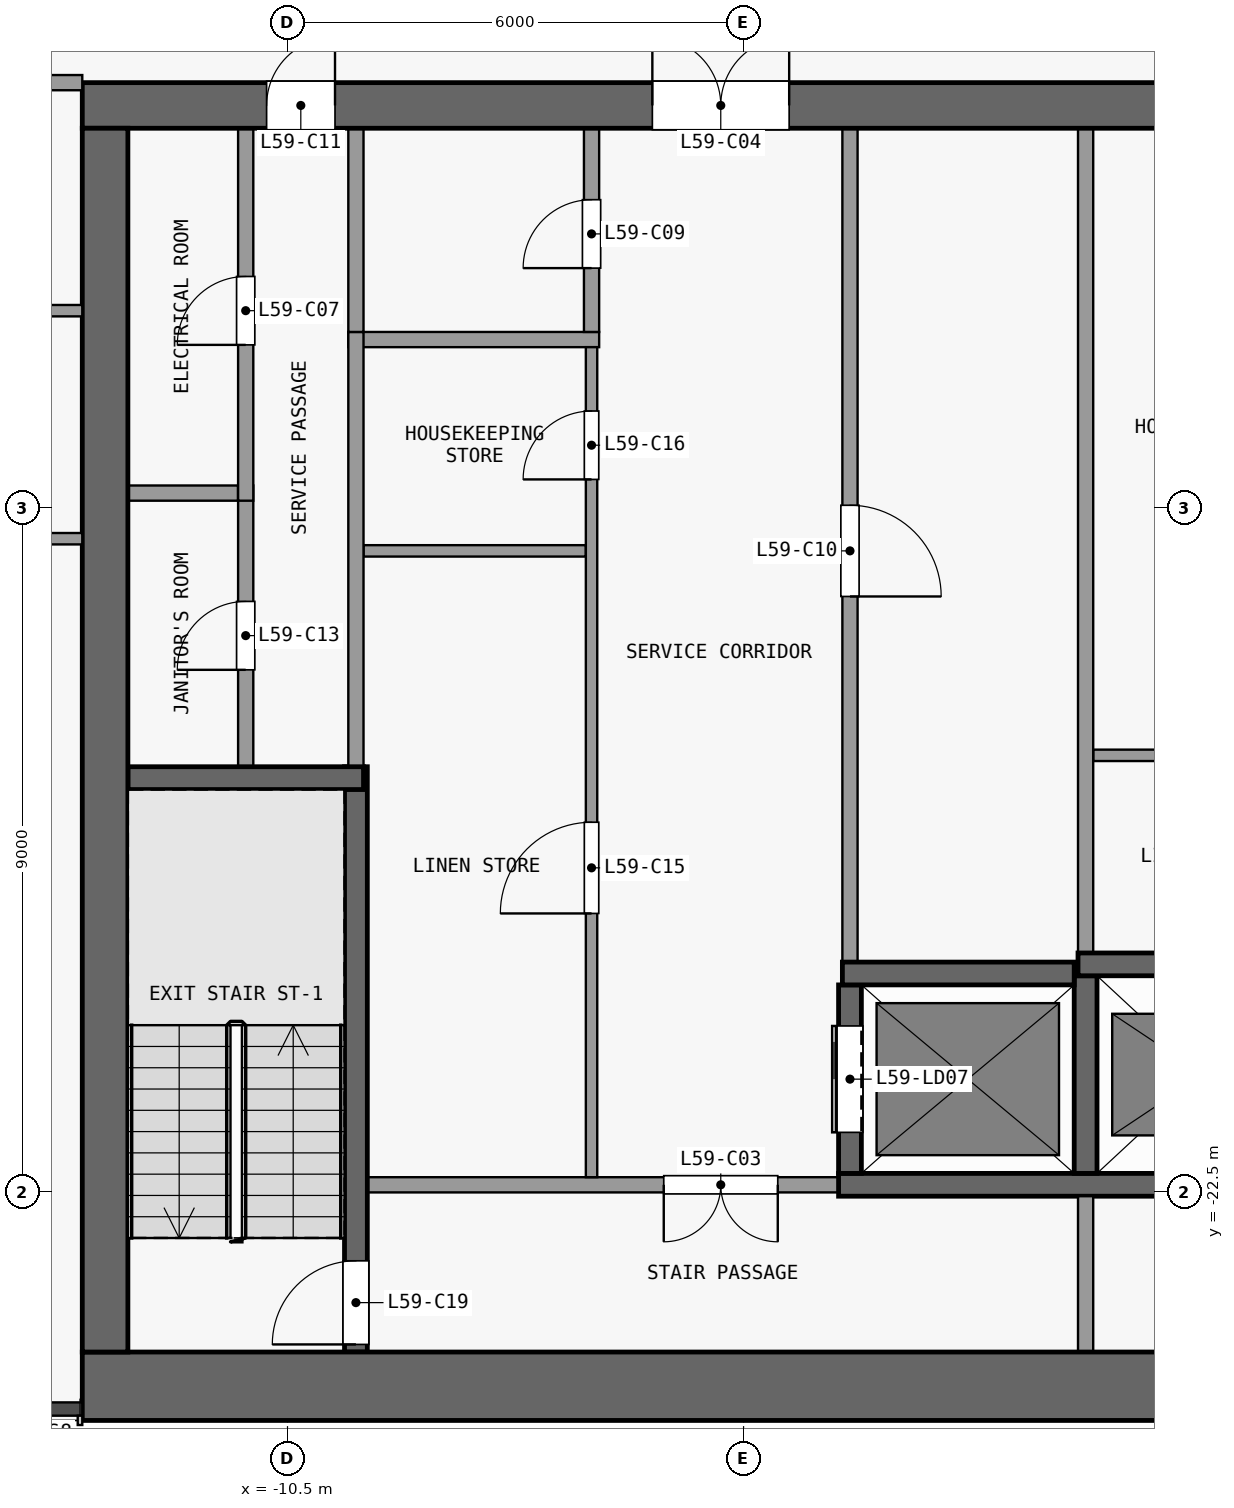
"""IFC4 building model, lengths in metres.
Left out: names, types, materials, properties, quantities, classifications, styles, units other than length and angle.
Written with IfcOpenShell. Run it as: python <this file> out.ifc"""

import sys

from ifc_helpers import new_model, si_unit, direction, frame, frame_2d, origin, place, context, subcontext, project, spatial, rectangle, extrude, element, fill, save


model = new_model("IFC4")
c1 = context("Model", 3, precision=1e-05, world=origin(), true_north=direction((0.0, 1.0)))
c2 = subcontext(c1, "Body", "Model", "MODEL_VIEW")
j1 = project(units=[si_unit("LENGTHUNIT", "METRE"), si_unit("PLANEANGLEUNIT", "RADIAN")], contexts=[c1])
p1 = place(None, origin())
s1 = spatial("IfcSite", under=j1, at=p1, CompositionType="ELEMENT")
p2 = place(p1, origin())
s2 = spatial("IfcBuilding", under=s1, at=p2, CompositionType="ELEMENT")
p3 = place(p2, frame((0.0, 0.0, 233.9)))
s3 = spatial("IfcBuildingStorey", under=s2, at=p3, CompositionType="ELEMENT", Elevation=233.9)
p4 = place(p3, frame((-13.2, -25.05, 0.0), z_axis=(0.0, 0.0, 1.0), x_axis=(1.0, 0.0, 0.0)))
e1 = element("IfcWall", 1, at=p4, inside=s3, PredefinedType="SHEAR", context=c2, shape_type="SweptSolid", body=[
    extrude(rectangle(XDim=26.4, YDim=0.9, at=frame_2d((13.2, 0.0))), origin(), (0.0, 0.0, 1.0), 3.3),
])
p5 = place(p3, frame((-13.2, -8.2, 0.0), z_axis=(0.0, 0.0, 1.0), x_axis=(1.0, 0.0, 0.0)))
e2 = element("IfcWall", 2, at=p5, inside=s3, PredefinedType="SHEAR", context=c2, shape_type="SweptSolid", body=[
    extrude(rectangle(XDim=26.4, YDim=0.6, at=frame_2d((13.2, 0.0))), origin(), (0.0, 0.0, 1.0), 3.3),
])
p6 = place(p5, frame((7.5, 0.0, 0.0)))
e3 = element("IfcOpeningElement", 3, at=p6, cuts=e2, PredefinedType="OPENING", context=c2, shape_type="SweptSolid", body=[
    extrude(rectangle(XDim=1.8, YDim=2.1, at=frame_2d((0.9, 1.05))), frame((0.0, 0.31, 0.0), z_axis=(0.0, -1.0, 0.0), x_axis=(1.0, 0.0, 0.0)), (0.0, 0.0, 1.0), 0.62),
])
p7 = place(p5, frame((17.1, 0.0, 0.0)))
e4 = element("IfcOpeningElement", 4, at=p7, cuts=e2, PredefinedType="OPENING", context=c2, shape_type="SweptSolid", body=[
    extrude(rectangle(XDim=1.8, YDim=2.1, at=frame_2d((0.9, 1.05))), frame((0.0, 0.31, 0.0), z_axis=(0.0, -1.0, 0.0), x_axis=(1.0, 0.0, 0.0)), (0.0, 0.0, 1.0), 0.62),
])
p8 = place(p5, frame((2.425, 0.0, 0.0)))
e5 = element("IfcOpeningElement", 5, at=p8, cuts=e2, PredefinedType="OPENING", context=c2, shape_type="SweptSolid", body=[
    extrude(rectangle(XDim=0.9, YDim=2.1, at=frame_2d((0.45, 1.05))), frame((0.0, 0.31, 0.0), z_axis=(0.0, -1.0, 0.0), x_axis=(1.0, 0.0, 0.0)), (0.0, 0.0, 1.0), 0.62),
])
p9 = place(p5, frame((23.075, 0.0, 0.0)))
e6 = element("IfcOpeningElement", 6, at=p9, cuts=e2, PredefinedType="OPENING", context=c2, shape_type="SweptSolid", body=[
    extrude(rectangle(XDim=0.9, YDim=2.1, at=frame_2d((0.45, 1.05))), frame((0.0, 0.31, 0.0), z_axis=(0.0, -1.0, 0.0), x_axis=(1.0, 0.0, 0.0)), (0.0, 0.0, 1.0), 0.62),
])
p10 = place(p3, frame((-12.9, -24.6, 0.0), z_axis=(0.0, 0.0, 1.0), x_axis=(0.0, 1.0, 0.0)))
e7 = element("IfcWall", 7, at=p10, inside=s3, PredefinedType="SHEAR", context=c2, shape_type="SweptSolid", body=[
    extrude(rectangle(XDim=16.1, YDim=0.6, at=frame_2d((8.05, 0.0))), origin(), (0.0, 0.0, 1.0), 3.3),
])
p11 = place(p3, frame((-3.25, -22.4, 0.0), z_axis=(0.0, 0.0, 1.0), x_axis=(-1.0, 0.0, 0.0)))
e8 = element("IfcWall", 8, at=p11, inside=s3, PredefinedType="PARTITIONING", context=c2, shape_type="SweptSolid", body=[
    extrude(rectangle(XDim=6.2, YDim=0.2, at=frame_2d((3.1, 0.0))), origin(), (0.0, 0.0, 1.0), 3.3),
])
p12 = place(p11, frame((0.8, 0.0, 0.0)))
e9 = element("IfcOpeningElement", 9, at=p12, cuts=e8, PredefinedType="OPENING", context=c2, shape_type="SweptSolid", body=[
    extrude(rectangle(XDim=1.5, YDim=2.1, at=frame_2d((0.75, 1.05))), frame((0.0, 0.11, 0.0), z_axis=(0.0, -1.0, 0.0), x_axis=(1.0, 0.0, 0.0)), (0.0, 0.0, 1.0), 0.22),
])
p13 = place(p3, frame((-3.25, -22.4, 0.0), z_axis=(0.0, 0.0, 1.0), x_axis=(1.0, 0.0, 0.0)))
e10 = element("IfcWall", 10, at=p13, inside=s3, PredefinedType="SHEAR", context=c2, shape_type="SweptSolid", body=[
    extrude(rectangle(XDim=6.5, YDim=0.3, at=frame_2d((3.25, 0.0))), origin(), (0.0, 0.0, 1.0), 3.3),
])
p14 = place(p3, frame((-3.2, -19.62, 0.0), z_axis=(0.0, 0.0, 1.0), x_axis=(1.0, 0.0, 0.0)))
e11 = element("IfcWall", 11, at=p14, inside=s3, PredefinedType="SHEAR", context=c2, shape_type="SweptSolid", body=[
    extrude(rectangle(XDim=3.05, YDim=0.3, at=frame_2d((1.525, 0.0))), origin(), (0.0, 0.0, 1.0), 3.3),
])
p15 = place(p3, frame((-0.1, -19.5, 0.0), z_axis=(0.0, 0.0, 1.0), x_axis=(1.0, 0.0, 0.0)))
e12 = element("IfcWall", 12, at=p15, inside=s3, PredefinedType="SHEAR", context=c2, shape_type="SweptSolid", body=[
    extrude(rectangle(XDim=3.275, YDim=0.3, at=frame_2d((1.638, 0.0))), origin(), (0.0, 0.0, 1.0), 3.3),
])
p16 = place(p3, frame((-12.6, -17.05, 0.0), z_axis=(0.0, 0.0, 1.0), x_axis=(1.0, 0.0, 0.0)))
e13 = element("IfcWall", 13, at=p16, inside=s3, PredefinedType="SHEAR", context=c2, shape_type="SweptSolid", body=[
    extrude(rectangle(XDim=3.1, YDim=0.3, at=frame_2d((1.55, 0.0))), origin(), (0.0, 0.0, 1.0), 3.3),
])
p17 = place(p3, frame((0.1, -16.75, 0.0), z_axis=(0.0, 0.0, 1.0), x_axis=(1.0, 0.0, 0.0)))
e14 = element("IfcWall", 14, at=p17, inside=s3, PredefinedType="PARTITIONING", context=c2, shape_type="SweptSolid", body=[
    extrude(rectangle(XDim=2.925, YDim=0.15, at=frame_2d((1.462, 0.0))), origin(), (0.0, 0.0, 1.0), 3.3),
])
p18 = place(p3, frame((-9.5, -14.06, 0.0), z_axis=(0.0, 0.0, 1.0), x_axis=(1.0, 0.0, 0.0)))
e15 = element("IfcWall", 15, at=p18, inside=s3, PredefinedType="PARTITIONING", context=c2, shape_type="SweptSolid", body=[
    extrude(rectangle(XDim=2.925, YDim=0.15, at=frame_2d((1.462, 0.0))), origin(), (0.0, 0.0, 1.0), 3.3),
])
p19 = place(p3, frame((-12.6, -13.3, 0.0), z_axis=(0.0, 0.0, 1.0), x_axis=(1.0, 0.0, 0.0)))
e16 = element("IfcWall", 16, at=p19, inside=s3, PredefinedType="PARTITIONING", context=c2, shape_type="SweptSolid", body=[
    extrude(rectangle(XDim=1.45, YDim=0.2, at=frame_2d((0.725, 0.0))), origin(), (0.0, 0.0, 1.0), 3.3),
])
p20 = place(p3, frame((-9.7, -11.28, 0.0), z_axis=(0.0, 0.0, 1.0), x_axis=(1.0, 0.0, 0.0)))
e17 = element("IfcWall", 17, at=p20, inside=s3, PredefinedType="PARTITIONING", context=c2, shape_type="SweptSolid", body=[
    extrude(rectangle(XDim=3.3, YDim=0.2, at=frame_2d((1.65, 0.0))), origin(), (0.0, 0.0, 1.0), 3.3),
])
p21 = place(p3, frame((-11.05, -16.9, 0.0), z_axis=(0.0, 0.0, 1.0), x_axis=(0.0, 1.0, 0.0)))
e18 = element("IfcWall", 18, at=p21, inside=s3, PredefinedType="PARTITIONING", context=c2, shape_type="SweptSolid", body=[
    extrude(rectangle(XDim=3.7, YDim=0.2, at=frame_2d((1.85, 0.0))), origin(), (0.0, 0.0, 1.0), 3.3),
])
p22 = place(p21, frame((1.275, 0.0, 0.0)))
e19 = element("IfcOpeningElement", 19, at=p22, cuts=e18, PredefinedType="OPENING", context=c2, shape_type="SweptSolid", body=[
    extrude(rectangle(XDim=0.9, YDim=2.1, at=frame_2d((0.45, 1.05))), frame((0.0, 0.11, 0.0), z_axis=(0.0, -1.0, 0.0), x_axis=(1.0, 0.0, 0.0)), (0.0, 0.0, 1.0), 0.22),
])
p23 = place(p3, frame((-11.05, -13.4, 0.0), z_axis=(0.0, 0.0, 1.0), x_axis=(0.0, 1.0, 0.0)))
e20 = element("IfcWall", 20, at=p23, inside=s3, PredefinedType="PARTITIONING", context=c2, shape_type="SweptSolid", body=[
    extrude(rectangle(XDim=4.9, YDim=0.2, at=frame_2d((2.45, 0.0))), origin(), (0.0, 0.0, 1.0), 3.3),
])
p24 = place(p23, frame((2.05, 0.0, 0.0)))
e21 = element("IfcOpeningElement", 21, at=p24, cuts=e20, PredefinedType="OPENING", context=c2, shape_type="SweptSolid", body=[
    extrude(rectangle(XDim=0.9, YDim=2.1, at=frame_2d((0.45, 1.05))), frame((0.0, 0.11, 0.0), z_axis=(0.0, -1.0, 0.0), x_axis=(1.0, 0.0, 0.0)), (0.0, 0.0, 1.0), 0.22),
])
p25 = place(p3, frame((-9.6, -24.6, 0.0), z_axis=(0.0, 0.0, 1.0), x_axis=(0.0, 1.0, 0.0)))
e22 = element("IfcWall", 22, at=p25, inside=s3, PredefinedType="SHEAR", context=c2, shape_type="SweptSolid", body=[
    extrude(rectangle(XDim=7.7, YDim=0.3, at=frame_2d((3.85, 0.0))), origin(), (0.0, 0.0, 1.0), 3.3),
])
p26 = place(p25, frame((0.1, 0.0, 0.0)))
e23 = element("IfcOpeningElement", 23, at=p26, cuts=e22, PredefinedType="OPENING", context=c2, shape_type="SweptSolid", body=[
    extrude(rectangle(XDim=1.1, YDim=2.1, at=frame_2d((0.55, 1.05))), frame((0.0, 0.16, 0.0), z_axis=(0.0, -1.0, 0.0), x_axis=(1.0, 0.0, 0.0)), (0.0, 0.0, 1.0), 0.32),
])
p27 = place(p3, frame((-9.6, -16.9, 0.0), z_axis=(0.0, 0.0, 1.0), x_axis=(0.0, 1.0, 0.0)))
e24 = element("IfcWall", 24, at=p27, inside=s3, PredefinedType="PARTITIONING", context=c2, shape_type="SweptSolid", body=[
    extrude(rectangle(XDim=5.72, YDim=0.2, at=frame_2d((2.86, 0.0))), origin(), (0.0, 0.0, 1.0), 3.3),
])
p28 = place(p3, frame((-9.6, -11.18, 0.0), z_axis=(0.0, 0.0, 1.0), x_axis=(0.0, 1.0, 0.0)))
e25 = element("IfcWall", 25, at=p28, inside=s3, PredefinedType="PARTITIONING", context=c2, shape_type="SweptSolid", body=[
    extrude(rectangle(XDim=2.68, YDim=0.2, at=frame_2d((1.34, 0.0))), origin(), (0.0, 0.0, 1.0), 3.3),
])
p29 = place(p3, frame((-6.5, -22.3, 0.0), z_axis=(0.0, 0.0, 1.0), x_axis=(0.0, 1.0, 0.0)))
e26 = element("IfcWall", 26, at=p29, inside=s3, PredefinedType="PARTITIONING", context=c2, shape_type="SweptSolid", body=[
    extrude(rectangle(XDim=10.92, YDim=0.15, at=frame_2d((5.46, 0.0))), origin(), (0.0, 0.0, 1.0), 3.3),
])
p30 = place(p29, frame((3.47, 0.0, 0.0)))
e27 = element("IfcOpeningElement", 27, at=p30, cuts=e26, PredefinedType="OPENING", context=c2, shape_type="SweptSolid", body=[
    extrude(rectangle(XDim=1.2, YDim=2.1, at=frame_2d((0.6, 1.05))), frame((0.0, 0.085, 0.0), z_axis=(0.0, -1.0, 0.0), x_axis=(1.0, 0.0, 0.0)), (0.0, 0.0, 1.0), 0.17),
])
p31 = place(p29, frame((9.18, 0.0, 0.0)))
e28 = element("IfcOpeningElement", 28, at=p31, cuts=e26, PredefinedType="OPENING", context=c2, shape_type="SweptSolid", body=[
    extrude(rectangle(XDim=0.9, YDim=2.1, at=frame_2d((0.45, 1.05))), frame((0.0, 0.085, 0.0), z_axis=(0.0, -1.0, 0.0), x_axis=(1.0, 0.0, 0.0)), (0.0, 0.0, 1.0), 0.17),
])
p32 = place(p3, frame((-6.5, -11.18, 0.0), z_axis=(0.0, 0.0, 1.0), x_axis=(0.0, 1.0, 0.0)))
e29 = element("IfcWall", 29, at=p32, inside=s3, PredefinedType="PARTITIONING", context=c2, shape_type="SweptSolid", body=[
    extrude(rectangle(XDim=2.68, YDim=0.2, at=frame_2d((1.34, 0.0))), origin(), (0.0, 0.0, 1.0), 3.3),
])
p33 = place(p32, frame((0.84, 0.0, 0.0)))
e30 = element("IfcOpeningElement", 30, at=p33, cuts=e29, PredefinedType="OPENING", context=c2, shape_type="SweptSolid", body=[
    extrude(rectangle(XDim=0.9, YDim=2.1, at=frame_2d((0.45, 1.05))), frame((0.0, 0.11, 0.0), z_axis=(0.0, -1.0, 0.0), x_axis=(1.0, 0.0, 0.0)), (0.0, 0.0, 1.0), 0.22),
])
p34 = place(p3, frame((-3.1, -22.25, 0.0), z_axis=(0.0, 0.0, 1.0), x_axis=(0.0, 1.0, 0.0)))
e31 = element("IfcWall", 31, at=p34, inside=s3, PredefinedType="SHEAR", context=c2, shape_type="SweptSolid", body=[
    extrude(rectangle(XDim=2.48, YDim=0.3, at=frame_2d((1.24, 0.0))), origin(), (0.0, 0.0, 1.0), 3.3),
])
p35 = place(p34, frame((0.54, 0.0, 0.0)))
e32 = element("IfcOpeningElement", 32, at=p35, cuts=e31, PredefinedType="OPENING", context=c2, shape_type="SweptSolid", body=[
    extrude(rectangle(XDim=1.4, YDim=2.1, at=frame_2d((0.7, 1.05))), frame((0.0, 0.16, 0.0), z_axis=(0.0, -1.0, 0.0), x_axis=(1.0, 0.0, 0.0)), (0.0, 0.0, 1.0), 0.32),
])
p36 = place(p3, frame((-3.1, -8.5, 0.0), z_axis=(0.0, 0.0, 1.0), x_axis=(0.0, -1.0, 0.0)))
e33 = element("IfcWall", 33, at=p36, inside=s3, PredefinedType="PARTITIONING", context=c2, shape_type="SweptSolid", body=[
    extrude(rectangle(XDim=10.97, YDim=0.2, at=frame_2d((5.485, 0.0))), origin(), (0.0, 0.0, 1.0), 3.3),
])
p37 = place(p36, frame((4.96, 0.0, 0.0)))
e34 = element("IfcOpeningElement", 34, at=p37, cuts=e33, PredefinedType="OPENING", context=c2, shape_type="SweptSolid", body=[
    extrude(rectangle(XDim=1.2, YDim=2.1, at=frame_2d((0.6, 1.05))), frame((0.0, 0.11, 0.0), z_axis=(0.0, -1.0, 0.0), x_axis=(1.0, 0.0, 0.0)), (0.0, 0.0, 1.0), 0.22),
])
p38 = place(p3, frame((0.0, -24.6, 0.0), z_axis=(0.0, 0.0, 1.0), x_axis=(0.0, 1.0, 0.0)))
e35 = element("IfcWall", 35, at=p38, inside=s3, PredefinedType="PARTITIONING", context=c2, shape_type="SweptSolid", body=[
    extrude(rectangle(XDim=2.05, YDim=0.2, at=frame_2d((1.025, 0.0))), origin(), (0.0, 0.0, 1.0), 3.3),
])
p39 = place(p3, frame((0.0, -22.25, 0.0), z_axis=(0.0, 0.0, 1.0), x_axis=(0.0, 1.0, 0.0)))
e36 = element("IfcWall", 36, at=p39, inside=s3, PredefinedType="SHEAR", context=c2, shape_type="SweptSolid", body=[
    extrude(rectangle(XDim=2.6, YDim=0.3, at=frame_2d((1.3, 0.0))), origin(), (0.0, 0.0, 1.0), 3.3),
])
p40 = place(p3, frame((0.0, -19.35, 0.0), z_axis=(0.0, 0.0, 1.0), x_axis=(0.0, 1.0, 0.0)))
e37 = element("IfcWall", 37, at=p40, inside=s3, PredefinedType="PARTITIONING", context=c2, shape_type="SweptSolid", body=[
    extrude(rectangle(XDim=10.85, YDim=0.2, at=frame_2d((5.425, 0.0))), origin(), (0.0, 0.0, 1.0), 3.3),
])
p41 = place(p3, frame((-19.262, -13.9, 0.0), z_axis=(0.0, 0.0, 1.0), x_axis=(1.0, 0.0, 0.0)))
e38 = element("IfcWall", 38, at=p41, inside=s3, PredefinedType="PARTITIONING", context=c2, shape_type="SweptSolid", body=[
    extrude(rectangle(XDim=6.062, YDim=0.15, at=frame_2d((3.031, 0.0))), origin(), (0.0, 0.0, 1.0), 3.3),
])
p42 = place(p41, frame((0.712, 0.0, 0.0)))
e39 = element("IfcOpeningElement", 39, at=p42, cuts=e38, PredefinedType="OPENING", context=c2, shape_type="SweptSolid", body=[
    extrude(rectangle(XDim=0.9, YDim=2.1, at=frame_2d((0.45, 1.05))), frame((0.0, 0.085, 0.0), z_axis=(0.0, -1.0, 0.0), x_axis=(1.0, 0.0, 0.0)), (0.0, 0.0, 1.0), 0.17),
])
p43 = place(p3, frame((-19.262, -10.9, 0.0), z_axis=(0.0, 0.0, 1.0), x_axis=(1.0, 0.0, 0.0)))
e40 = element("IfcWall", 40, at=p43, inside=s3, PredefinedType="PARTITIONING", context=c2, shape_type="SweptSolid", body=[
    extrude(rectangle(XDim=6.062, YDim=0.15, at=frame_2d((3.031, 0.0))), origin(), (0.0, 0.0, 1.0), 3.3),
])
p44 = place(p43, frame((1.012, 0.0, 0.0)))
e41 = element("IfcOpeningElement", 41, at=p44, cuts=e40, PredefinedType="OPENING", context=c2, shape_type="SweptSolid", body=[
    extrude(rectangle(XDim=0.9, YDim=2.1, at=frame_2d((0.45, 1.05))), frame((0.0, 0.085, 0.0), z_axis=(0.0, -1.0, 0.0), x_axis=(1.0, 0.0, 0.0)), (0.0, 0.0, 1.0), 0.17),
])
p45 = place(p43, frame((4.162, 0.0, 0.0)))
e42 = element("IfcOpeningElement", 42, at=p45, cuts=e40, PredefinedType="OPENING", context=c2, shape_type="SweptSolid", body=[
    extrude(rectangle(XDim=0.9, YDim=2.1, at=frame_2d((0.45, 1.05))), frame((0.0, 0.085, 0.0), z_axis=(0.0, -1.0, 0.0), x_axis=(1.0, 0.0, 0.0)), (0.0, 0.0, 1.0), 0.17),
])
p46 = place(p3, frame((-19.262, -7.9, 0.0), z_axis=(0.0, 0.0, 1.0), x_axis=(1.0, 0.0, 0.0)))
e43 = element("IfcWall", 43, at=p46, inside=s3, PredefinedType="PARTITIONING", context=c2, shape_type="SweptSolid", body=[
    extrude(rectangle(XDim=6.062, YDim=0.2, at=frame_2d((3.031, 0.0))), origin(), (0.0, 0.0, 1.0), 3.3),
])
p47 = place(p46, frame((2.512, 0.0, 0.0)))
e44 = element("IfcOpeningElement", 44, at=p47, cuts=e43, PredefinedType="OPENING", context=c2, shape_type="SweptSolid", body=[
    extrude(rectangle(XDim=1.0, YDim=2.1, at=frame_2d((0.5, 1.05))), frame((0.0, 0.11, 0.0), z_axis=(0.0, -1.0, 0.0), x_axis=(1.0, 0.0, 0.0)), (0.0, 0.0, 1.0), 0.22),
])
p48 = place(p35, origin())
e45 = element("IfcDoor", 45, at=p48, inside=s3, OperationType="DOUBLE_DOOR_SLIDING", PredefinedType="DOOR", context=c2, shape_type="SweptSolid", body=[
    extrude(rectangle(XDim=1.4, YDim=2.1, at=frame_2d((0.7, 1.05))), frame((0.0, 0.025, 0.0), z_axis=(0.0, -1.0, 0.0), x_axis=(1.0, 0.0, 0.0)), (0.0, 0.0, 1.0), 0.05),
])
fill(e32, e45)
p49 = place(p12, origin())
e46 = element("IfcDoor", 46, at=p49, inside=s3, OperationType="DOUBLE_DOOR_SINGLE_SWING", PredefinedType="DOOR", context=c2, shape_type="SweptSolid", body=[
    extrude(rectangle(XDim=1.5, YDim=2.1, at=frame_2d((0.75, 1.05))), frame((0.0, 0.025, 0.0), z_axis=(0.0, -1.0, 0.0), x_axis=(1.0, 0.0, 0.0)), (0.0, 0.0, 1.0), 0.05),
])
fill(e9, e46)
p50 = place(p6, origin())
e47 = element("IfcDoor", 47, at=p50, inside=s3, OperationType="DOUBLE_DOOR_SINGLE_SWING", PredefinedType="DOOR", context=c2, shape_type="SweptSolid", body=[
    extrude(rectangle(XDim=1.8, YDim=2.1, at=frame_2d((0.9, 1.05))), frame((0.0, 0.025, 0.0), z_axis=(0.0, -1.0, 0.0), x_axis=(1.0, 0.0, 0.0)), (0.0, 0.0, 1.0), 0.05),
])
fill(e3, e47)
p51 = place(p24, origin())
e48 = element("IfcDoor", 48, at=p51, inside=s3, OperationType="SINGLE_SWING_LEFT", PredefinedType="DOOR", context=c2, shape_type="SweptSolid", body=[
    extrude(rectangle(XDim=0.9, YDim=2.1, at=frame_2d((0.45, 1.05))), frame((0.0, 0.025, 0.0), z_axis=(0.0, -1.0, 0.0), x_axis=(1.0, 0.0, 0.0)), (0.0, 0.0, 1.0), 0.05),
])
fill(e21, e48)
p52 = place(p33, origin())
e49 = element("IfcDoor", 49, at=p52, inside=s3, OperationType="SINGLE_SWING_LEFT", PredefinedType="DOOR", context=c2, shape_type="SweptSolid", body=[
    extrude(rectangle(XDim=0.9, YDim=2.1, at=frame_2d((0.45, 1.05))), frame((0.0, 0.025, 0.0), z_axis=(0.0, -1.0, 0.0), x_axis=(1.0, 0.0, 0.0)), (0.0, 0.0, 1.0), 0.05),
])
fill(e30, e49)
p53 = place(p37, origin())
e50 = element("IfcDoor", 50, at=p53, inside=s3, OperationType="SINGLE_SWING_RIGHT", PredefinedType="DOOR", context=c2, shape_type="SweptSolid", body=[
    extrude(rectangle(XDim=1.2, YDim=2.1, at=frame_2d((0.6, 1.05))), frame((0.0, 0.025, 0.0), z_axis=(0.0, -1.0, 0.0), x_axis=(1.0, 0.0, 0.0)), (0.0, 0.0, 1.0), 0.05),
])
fill(e34, e50)
p54 = place(p8, origin())
e51 = element("IfcDoor", 51, at=p54, inside=s3, OperationType="SINGLE_SWING_RIGHT", PredefinedType="DOOR", context=c2, shape_type="SweptSolid", body=[
    extrude(rectangle(XDim=0.9, YDim=2.1, at=frame_2d((0.45, 1.05))), frame((0.0, 0.025, 0.0), z_axis=(0.0, -1.0, 0.0), x_axis=(1.0, 0.0, 0.0)), (0.0, 0.0, 1.0), 0.05),
])
fill(e5, e51)
p55 = place(p22, origin())
e52 = element("IfcDoor", 52, at=p55, inside=s3, OperationType="SINGLE_SWING_LEFT", PredefinedType="DOOR", context=c2, shape_type="SweptSolid", body=[
    extrude(rectangle(XDim=0.9, YDim=2.1, at=frame_2d((0.45, 1.05))), frame((0.0, 0.025, 0.0), z_axis=(0.0, -1.0, 0.0), x_axis=(1.0, 0.0, 0.0)), (0.0, 0.0, 1.0), 0.05),
])
fill(e19, e52)
p56 = place(p30, origin())
e53 = element("IfcDoor", 53, at=p56, inside=s3, OperationType="SINGLE_SWING_LEFT", PredefinedType="DOOR", context=c2, shape_type="SweptSolid", body=[
    extrude(rectangle(XDim=1.2, YDim=2.1, at=frame_2d((0.6, 1.05))), frame((0.0, 0.025, 0.0), z_axis=(0.0, -1.0, 0.0), x_axis=(1.0, 0.0, 0.0)), (0.0, 0.0, 1.0), 0.05),
])
fill(e27, e53)
p57 = place(p31, origin())
e54 = element("IfcDoor", 54, at=p57, inside=s3, OperationType="SINGLE_SWING_LEFT", PredefinedType="DOOR", context=c2, shape_type="SweptSolid", body=[
    extrude(rectangle(XDim=0.9, YDim=2.1, at=frame_2d((0.45, 1.05))), frame((0.0, 0.025, 0.0), z_axis=(0.0, -1.0, 0.0), x_axis=(1.0, 0.0, 0.0)), (0.0, 0.0, 1.0), 0.05),
])
fill(e28, e54)
p58 = place(p26, origin())
e55 = element("IfcDoor", 55, at=p58, inside=s3, OperationType="SINGLE_SWING_LEFT", PredefinedType="DOOR", context=c2, shape_type="SweptSolid", body=[
    extrude(rectangle(XDim=1.1, YDim=2.1, at=frame_2d((0.55, 1.05))), frame((0.0, 0.025, 0.0), z_axis=(0.0, -1.0, 0.0), x_axis=(1.0, 0.0, 0.0)), (0.0, 0.0, 1.0), 0.05),
])
fill(e23, e55)
save(model, sys.argv[1])
